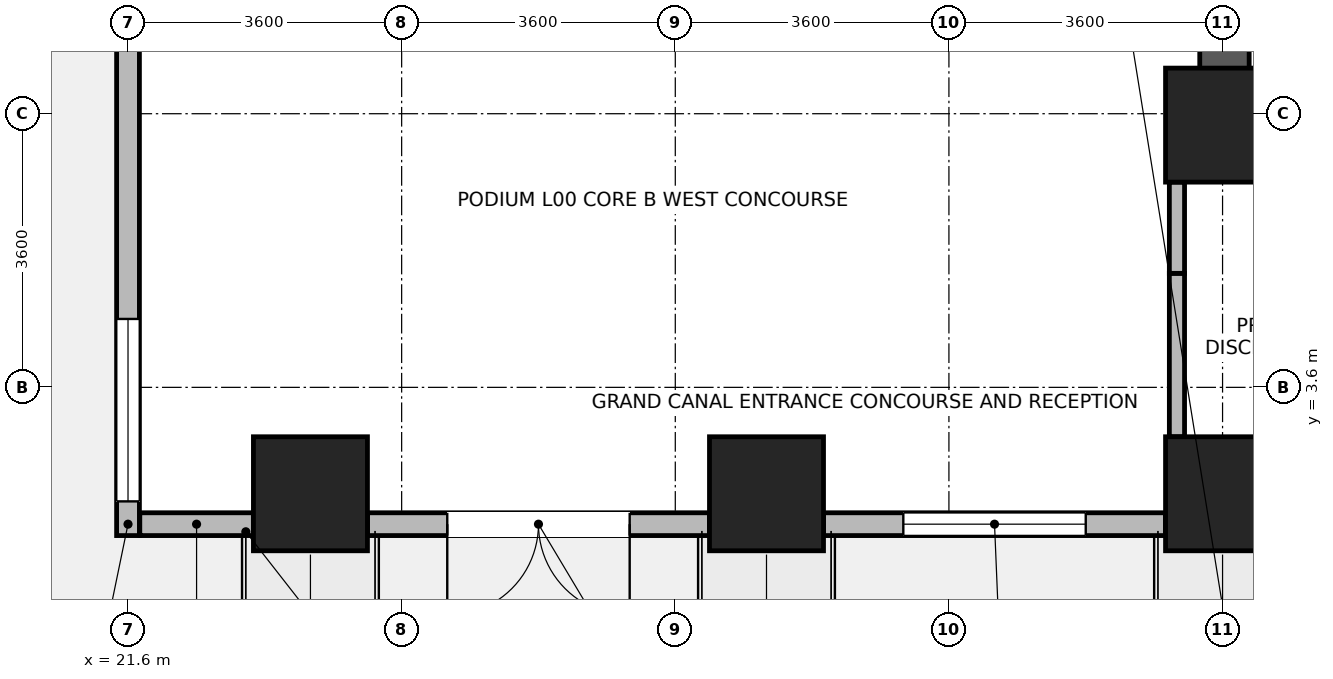
"""IFC4 building model, lengths in metres.
Left out: names, types, materials, properties, quantities, classifications, styles, units other than length and angle.
Written with IfcOpenShell. Run it as: python <this file> out.ifc"""

import sys

from ifc_helpers import new_model, si_unit, direction, frame, frame_2d, origin, origin_2d, place, context, subcontext, project, spatial, rectangle, extrude, source, transform, mapped, element, fill, save


model = new_model("IFC4")
c1 = context("Model", 3, precision=1e-05, world=origin(), true_north=direction((0.0, 1.0)))
c2 = subcontext(c1, "Body", "Model", "MODEL_VIEW")
j1 = project(units=[si_unit("LENGTHUNIT", "METRE"), si_unit("PLANEANGLEUNIT", "RADIAN")], contexts=[c1])
p1 = place(None, origin())
s1 = spatial("IfcSite", under=j1, at=p1, CompositionType="ELEMENT")
p2 = place(p1, origin())
s2 = spatial("IfcBuilding", under=s1, at=p2, CompositionType="ELEMENT")
p3 = place(p2, origin())
s3 = spatial("IfcBuildingStorey", under=s2, at=p3, CompositionType="ELEMENT", Elevation=0.0)
p4 = place(p3, frame((36.025, 6.65, 0.0), z_axis=(0.0, 0.0, 1.0), x_axis=(0.0, 1.0, 0.0)))
e1 = element("IfcWall", 1, at=p4, inside=s3, PredefinedType="SHEAR", context=c2, shape_type="SweptSolid", body=[
    extrude(rectangle(XDim=8.3, YDim=0.65, at=frame_2d((4.15, 0.0))), origin(), (0.0, 0.0, 1.0), 5.12),
])
p5 = place(p3, frame((36.35, 6.975, 0.0), z_axis=(0.0, 0.0, 1.0), x_axis=(1.0, 0.0, 0.0)))
e2 = element("IfcWall", 2, at=p5, inside=s3, PredefinedType="SHEAR", context=c2, shape_type="SweptSolid", body=[
    extrude(rectangle(XDim=3.2, YDim=0.65, at=frame_2d((1.6, 0.0))), origin(), (0.0, 0.0, 1.0), 5.12),
])
p6 = place(p5, frame((0.85, 0.0, 0.0)))
e3 = element("IfcOpeningElement", 3, at=p6, cuts=e2, PredefinedType="OPENING", context=c2, shape_type="SweptSolid", body=[
    extrude(rectangle(XDim=1.1, YDim=2.08, at=frame_2d((0.55, 1.04))), frame((0.0, 0.335, 0.0), z_axis=(0.0, -1.0, 0.0), x_axis=(1.0, 0.0, 0.0)), (0.0, 0.0, 1.0), 0.67),
])
m1 = source(origin(), c2, "Body", "SweptSolid", [
    extrude(rectangle(XDim=1.5, YDim=1.5, at=origin_2d()), origin(), (0.0, 0.0, 1.0), 5.4),
])
for number, where, z_axis, x_axis in (
    (4, (36.0, 7.05, 0.0), (0.0, 0.0, 1.0), (1.0, 0.0, 0.0)),
    (5, (36.0, 2.2, 0.0), (0.0, 0.0, 1.0), (1.0, 0.0, 0.0)),
    (6, (30.0, 2.2, 0.0), (0.0, 0.0, 1.0), (1.0, 0.0, 0.0)),
    (7, (24.0, 2.2, 0.0), (0.0, 0.0, 1.0), (1.0, 0.0, 0.0)),
):
    element("IfcColumn", number, at=place(p3, frame(where, z_axis=z_axis, x_axis=x_axis)), inside=s3, PredefinedType="COLUMN", context=c2, shape_type="MappedRepresentation", body=[
        mapped(m1, transform((0.0, 0.0, 0.0), x_axis=(1.0, 0.0, 0.0), y_axis=(0.0, 1.0, 0.0), z_axis=(0.0, 0.0, 1.0), scale=1.0)),
    ])
p7 = place(p3, frame((23.249, 1.8, 0.0), z_axis=(0.0, 0.0, 1.0), x_axis=(-1.0, 0.0, 0.0)))
e8 = element("IfcWall", 8, at=p7, inside=s3, PredefinedType="STANDARD", context=c2, shape_type="SweptSolid", body=[
    extrude(rectangle(XDim=1.494, YDim=0.3, at=frame_2d((0.747, 0.0))), origin(), (0.0, 0.0, 1.0), 5.1),
])
p8 = place(p3, frame((29.249, 1.8, 0.0), z_axis=(0.0, 0.0, 1.0), x_axis=(-1.0, 0.0, 0.0)))
e9 = element("IfcWall", 9, at=p8, inside=s3, PredefinedType="STANDARD", context=c2, shape_type="SweptSolid", body=[
    extrude(rectangle(XDim=4.498, YDim=0.3, at=frame_2d((2.249, 0.0))), origin(), (0.0, 0.0, 1.0), 5.1),
])
p9 = place(p8, frame((1.049, 0.0, 0.0)))
e10 = element("IfcOpeningElement", 10, at=p9, cuts=e9, PredefinedType="OPENING", context=c2, shape_type="SweptSolid", body=[
    extrude(rectangle(XDim=2.4, YDim=2.6, at=frame_2d((1.2, 1.3))), frame((0.0, 0.16, 0.0), z_axis=(0.0, -1.0, 0.0), x_axis=(1.0, 0.0, 0.0)), (0.0, 0.0, 1.0), 0.32),
])
p10 = place(p3, frame((35.249, 1.8, 0.0), z_axis=(0.0, 0.0, 1.0), x_axis=(-1.0, 0.0, 0.0)))
e11 = element("IfcWall", 11, at=p10, inside=s3, PredefinedType="STANDARD", context=c2, shape_type="SweptSolid", body=[
    extrude(rectangle(XDim=4.498, YDim=0.3, at=frame_2d((2.249, 0.0))), origin(), (0.0, 0.0, 1.0), 5.1),
])
p11 = place(p10, frame((1.049, 0.0, 0.9)))
e12 = element("IfcOpeningElement", 12, at=p11, cuts=e11, PredefinedType="OPENING", context=c2, shape_type="SweptSolid", body=[
    extrude(rectangle(XDim=2.4, YDim=2.5, at=frame_2d((1.2, 1.25))), frame((0.0, 0.16, 0.0), z_axis=(0.0, -1.0, 0.0), x_axis=(1.0, 0.0, 0.0)), (0.0, 0.0, 1.0), 0.32),
])
p12 = place(p3, frame((21.6, 1.65, 0.0), z_axis=(0.0, 0.0, 1.0), x_axis=(0.0, 1.0, 0.0)))
e13 = element("IfcWall", 13, at=p12, inside=s3, PredefinedType="STANDARD", context=c2, shape_type="SweptSolid", body=[
    extrude(rectangle(XDim=16.5, YDim=0.3, at=frame_2d((8.25, 0.0))), origin(), (0.0, 0.0, 1.0), 5.1),
])
p13 = place(p12, frame((13.125, 0.0, 0.0)))
e14 = element("IfcOpeningElement", 14, at=p13, cuts=e13, PredefinedType="OPENING", context=c2, shape_type="SweptSolid", body=[
    extrude(rectangle(XDim=1.85, YDim=2.25, at=frame_2d((0.925, 1.125))), frame((0.0, 0.16, 0.0), z_axis=(0.0, -1.0, 0.0), x_axis=(1.0, 0.0, 0.0)), (0.0, 0.0, 1.0), 0.32),
])
p14 = place(p12, frame((0.45, 0.0, 0.9)))
e15 = element("IfcOpeningElement", 15, at=p14, cuts=e13, PredefinedType="OPENING", context=c2, shape_type="SweptSolid", body=[
    extrude(rectangle(XDim=2.4, YDim=2.5, at=frame_2d((1.2, 1.25))), frame((0.0, 0.16, 0.0), z_axis=(0.0, -1.0, 0.0), x_axis=(1.0, 0.0, 0.0)), (0.0, 0.0, 1.0), 0.32),
])
p15 = place(p12, frame((7.05, 0.0, 0.9)))
e16 = element("IfcOpeningElement", 16, at=p15, cuts=e13, PredefinedType="OPENING", context=c2, shape_type="SweptSolid", body=[
    extrude(rectangle(XDim=2.4, YDim=2.5, at=frame_2d((1.2, 1.25))), frame((0.0, 0.16, 0.0), z_axis=(0.0, -1.0, 0.0), x_axis=(1.0, 0.0, 0.0)), (0.0, 0.0, 1.0), 0.32),
])
p16 = place(p3, frame((35.4, 2.95, 0.0), z_axis=(0.0, 0.0, 1.0), x_axis=(0.0, 1.0, 0.0)))
e17 = element("IfcWall", 17, at=p16, inside=s3, PredefinedType="PARTITIONING", context=c2, shape_type="SweptSolid", body=[
    extrude(rectangle(XDim=2.15, YDim=0.2, at=frame_2d((1.075, 0.0))), origin(), (0.0, 0.0, 1.0), 5.1),
])
p17 = place(p3, frame((35.4, 5.1, 0.0), z_axis=(0.0, 0.0, 1.0), x_axis=(0.0, 1.0, 0.0)))
e18 = element("IfcWall", 18, at=p17, inside=s3, PredefinedType="PARTITIONING", context=c2, shape_type="SweptSolid", body=[
    extrude(rectangle(XDim=1.2, YDim=0.2, at=frame_2d((0.6, 0.0))), origin(), (0.0, 0.0, 1.0), 5.1),
])
p18 = place(p9, origin())
e19 = element("IfcDoor", 19, at=p18, inside=s3, OperationType="DOUBLE_DOOR_SINGLE_SWING", PredefinedType="DOOR", context=c2, shape_type="SweptSolid", body=[
    extrude(rectangle(XDim=2.4, YDim=2.6, at=frame_2d((1.2, 1.3))), frame((0.0, 0.025, 0.0), z_axis=(0.0, -1.0, 0.0), x_axis=(1.0, 0.0, 0.0)), (0.0, 0.0, 1.0), 0.05),
])
fill(e10, e19)
p19 = place(p11, origin())
e20 = element("IfcWindow", 20, at=p19, inside=s3, PartitioningType="SINGLE_PANEL", PredefinedType="WINDOW", context=c2, shape_type="SweptSolid", body=[
    extrude(rectangle(XDim=2.4, YDim=2.5, at=frame_2d((1.2, 1.25))), frame((0.0, 0.03, 0.0), z_axis=(0.0, -1.0, 0.0), x_axis=(1.0, 0.0, 0.0)), (0.0, 0.0, 1.0), 0.06),
])
fill(e12, e20)
p20 = place(p14, origin())
e21 = element("IfcWindow", 21, at=p20, inside=s3, PartitioningType="SINGLE_PANEL", PredefinedType="WINDOW", context=c2, shape_type="SweptSolid", body=[
    extrude(rectangle(XDim=2.4, YDim=2.5, at=frame_2d((1.2, 1.25))), frame((0.0, 0.03, 0.0), z_axis=(0.0, -1.0, 0.0), x_axis=(1.0, 0.0, 0.0)), (0.0, 0.0, 1.0), 0.06),
])
fill(e15, e21)
save(model, sys.argv[1])
